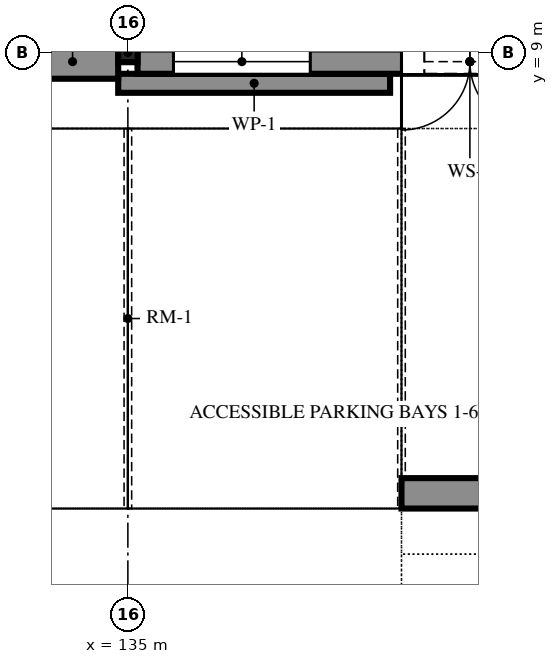
"""IFC4 building model, lengths in metres.
Left out: names, types, materials, properties, quantities, classifications, styles, units other than length and angle.
Written with IfcOpenShell. Run it as: python <this file> out.ifc"""

import sys

from ifc_helpers import new_model, si_unit, direction, frame, frame_2d, origin, origin_2d, place, context, subcontext, project, spatial, polyline, rectangle, i_section, outline, extrude, element, fill, save


model = new_model("IFC4")
c1 = context("Model", 3, precision=1e-05, world=origin(), true_north=direction((0.0, 1.0)))
c2 = subcontext(c1, "Body", "Model", "MODEL_VIEW")
j1 = project(units=[si_unit("LENGTHUNIT", "METRE"), si_unit("PLANEANGLEUNIT", "RADIAN")], contexts=[c1])
p1 = place(None, origin())
s1 = spatial("IfcSite", under=j1, at=p1, CompositionType="ELEMENT")
p2 = place(p1, origin())
s2 = spatial("IfcBuilding", under=s1, at=p2, CompositionType="ELEMENT")
p3 = place(p2, origin())
s3 = spatial("IfcBuildingStorey", under=s2, at=p3, CompositionType="ELEMENT", Elevation=0.0)
p4 = place(p3, frame((135.0, 9.0, -2.1), z_axis=(0.0, 0.0, 1.0), x_axis=(1.0, 0.0, 0.0)))
e1 = element("IfcColumn", 1, at=p4, inside=s3, PredefinedType="COLUMN", context=c2, shape_type="SweptSolid", body=[
    extrude(i_section(OverallWidth=0.255, OverallDepth=0.254, WebThickness=0.009, FlangeThickness=0.014, FilletRadius=0.013, at=origin_2d()), origin(), (0.0, 0.0, 1.0), 9.6),
])
p5 = place(p3, frame((133.673, 8.88, 0.0), z_axis=(0.0, 0.0, 1.0), x_axis=(1.0, 0.0, 0.0)))
e2 = element("IfcWall", 2, at=p5, inside=s3, PredefinedType="SOLIDWALL", context=c2, shape_type="SweptSolid", body=[
    extrude(rectangle(XDim=1.2, YDim=0.45, at=frame_2d((0.6, 0.0))), origin(), (0.0, 0.0, 1.0), 6.767),
])
p6 = place(p3, frame((135.127, 8.88, 0.0), z_axis=(0.0, 0.0, 1.0), x_axis=(1.0, 0.0, 0.0)))
e3 = element("IfcWall", 3, at=p6, inside=s3, PredefinedType="SOLIDWALL", context=c2, shape_type="SweptSolid", body=[
    extrude(rectangle(XDim=8.746, YDim=0.32, at=frame_2d((4.373, 0.0))), origin(), (0.0, 0.0, 1.0), 6.767),
])
p7 = place(p6, frame((3.473, 0.0, 0.0)))
e4 = element("IfcOpeningElement", 4, at=p7, cuts=e3, PredefinedType="OPENING", context=c2, shape_type="SweptSolid", body=[
    extrude(rectangle(XDim=1.8, YDim=2.1, at=frame_2d((0.9, 1.05))), frame((0.0, 0.17, 0.0), z_axis=(0.0, -1.0, 0.0), x_axis=(1.0, 0.0, 0.0)), (0.0, 0.0, 1.0), 0.34),
])
p8 = place(p6, frame((3.773, 0.0, 2.55)))
e5 = element("IfcOpeningElement", 5, at=p8, cuts=e3, PredefinedType="OPENING", context=c2, shape_type="SweptSolid", body=[
    extrude(rectangle(XDim=1.2, YDim=0.6, at=frame_2d((0.6, 0.3))), frame((0.0, 0.17, 0.0), z_axis=(0.0, -1.0, 0.0), x_axis=(1.0, 0.0, 0.0)), (0.0, 0.0, 1.0), 0.34),
])
p9 = place(p6, frame((0.473, 0.0, 0.9)))
e6 = element("IfcOpeningElement", 6, at=p9, cuts=e3, PredefinedType="OPENING", context=c2, shape_type="SweptSolid", body=[
    extrude(rectangle(XDim=1.8, YDim=3.6, at=frame_2d((0.9, 1.8))), frame((0.0, 0.17, 0.0), z_axis=(0.0, -1.0, 0.0), x_axis=(1.0, 0.0, 0.0)), (0.0, 0.0, 1.0), 0.34),
])
p10 = place(p6, frame((6.473, 0.0, 0.9)))
e7 = element("IfcOpeningElement", 7, at=p10, cuts=e3, PredefinedType="OPENING", context=c2, shape_type="SweptSolid", body=[
    extrude(rectangle(XDim=1.8, YDim=3.6, at=frame_2d((0.9, 1.8))), frame((0.0, 0.17, 0.0), z_axis=(0.0, -1.0, 0.0), x_axis=(1.0, 0.0, 0.0)), (0.0, 0.0, 1.0), 0.34),
])
p11 = place(p3, frame((134.873, 8.595, 0.0), z_axis=(0.0, 0.0, 1.0), x_axis=(1.0, 0.0, 0.0)))
e8 = element("IfcWall", 8, at=p11, inside=s3, PredefinedType="SOLIDWALL", context=c2, shape_type="SweptSolid", body=[
    extrude(outline(polyline([(0.0, 0.0), (3.577, 0.0), (3.577, 6.767), (0.0, 6.767), (0.0, 0.0)]), holes=[polyline([(0.577, 0.75), (0.577, 4.5), (0.619, 4.752), (0.787, 4.968), (0.934, 5.022), (1.06, 5.166), (1.333, 5.31), (1.627, 5.4), (1.921, 5.31), (2.194, 5.166), (2.32, 5.022), (2.467, 4.968), (2.635, 4.752), (2.677, 4.5), (2.677, 0.75), (0.577, 0.75)])]), frame((0.0, 0.125, 0.0), z_axis=(0.0, -1.0, 0.0), x_axis=(1.0, 0.0, 0.0)), (0.0, 0.0, 1.0), 0.25),
])
p12 = place(p3, frame((138.6, 3.2, -0.8), z_axis=(0.0, 0.0, 1.0), x_axis=(1.0, 0.0, 0.0)))
e9 = element("IfcWall", 9, at=p12, inside=s3, PredefinedType="SOLIDWALL", context=c2, shape_type="SweptSolid", body=[
    extrude(rectangle(XDim=27.4, YDim=0.4, at=frame_2d((13.7, 0.0))), origin(), (0.0, 0.0, 1.0), 0.8),
])
p13 = place(p7, frame((1.8, 0.0, 0.0), z_axis=(0.0, 0.0, 1.0), x_axis=(-1.0, 0.0, 0.0)))
e10 = element("IfcDoor", 10, at=p13, inside=s3, OperationType="DOUBLE_DOOR_SINGLE_SWING", PredefinedType="DOOR", context=c2, shape_type="SweptSolid", body=[
    extrude(outline(polyline([(0.0, 0.0), (0.07, 0.0), (0.07, 2.03), (1.73, 2.03), (1.73, 0.0), (1.8, 0.0), (1.8, 2.1), (0.0, 2.1), (0.0, 0.0)])), frame((0.0, 0.025, 0.0), z_axis=(0.0, -1.0, 0.0), x_axis=(1.0, 0.0, 0.0)), (0.0, 0.0, 1.0), 0.05),
    extrude(outline(polyline([(0.074, 0.01), (0.897, 0.01), (0.897, 2.026), (0.074, 2.026), (0.074, 0.01)]), holes=[polyline([(0.194, 0.16), (0.777, 0.16), (0.777, 1.01), (0.194, 1.01), (0.194, 0.16)]), polyline([(0.335, 1.16), (0.635, 1.16), (0.635, 1.76), (0.335, 1.76), (0.335, 1.16)])]), frame((0.0, 0.017, 0.0), z_axis=(0.0, -1.0, 0.0), x_axis=(1.0, 0.0, 0.0)), (0.0, 0.0, 1.0), 0.035),
    extrude(rectangle(XDim=0.583, YDim=0.85, at=frame_2d((0.485, 0.585))), frame((0.0, 0.009, 0.0), z_axis=(0.0, -1.0, 0.0), x_axis=(1.0, 0.0, 0.0)), (0.0, 0.0, 1.0), 0.017),
    extrude(rectangle(XDim=0.3, YDim=0.6, at=frame_2d((0.485, 1.46))), frame((0.0, 0.006, 0.0), z_axis=(0.0, -1.0, 0.0), x_axis=(1.0, 0.0, 0.0)), (0.0, 0.0, 1.0), 0.012),
    extrude(outline(polyline([(0.903, 0.01), (1.726, 0.01), (1.726, 2.026), (0.903, 2.026), (0.903, 0.01)]), holes=[polyline([(1.023, 0.16), (1.606, 0.16), (1.606, 1.01), (1.023, 1.01), (1.023, 0.16)]), polyline([(1.165, 1.16), (1.465, 1.16), (1.465, 1.76), (1.165, 1.76), (1.165, 1.16)])]), frame((0.0, 0.017, 0.0), z_axis=(0.0, -1.0, 0.0), x_axis=(1.0, 0.0, 0.0)), (0.0, 0.0, 1.0), 0.035),
    extrude(rectangle(XDim=0.583, YDim=0.85, at=frame_2d((1.314, 0.585))), frame((0.0, 0.009, 0.0), z_axis=(0.0, -1.0, 0.0), x_axis=(1.0, 0.0, 0.0)), (0.0, 0.0, 1.0), 0.017),
    extrude(rectangle(XDim=0.3, YDim=0.6, at=frame_2d((1.314, 1.46))), frame((0.0, 0.006, 0.0), z_axis=(0.0, -1.0, 0.0), x_axis=(1.0, 0.0, 0.0)), (0.0, 0.0, 1.0), 0.012),
])
fill(e4, e10)
p14 = place(p8, origin())
e11 = element("IfcWindow", 11, at=p14, inside=s3, PartitioningType="SINGLE_PANEL", PredefinedType="WINDOW", context=c2, shape_type="SweptSolid", body=[
    extrude(outline(polyline([(0.0, 0.0), (1.2, 0.0), (1.2, 0.6), (0.0, 0.6), (0.0, 0.0)]), holes=[polyline([(0.07, 0.07), (1.13, 0.07), (1.13, 0.53), (0.07, 0.53), (0.07, 0.07)])]), frame((0.0, 0.03, 0.0), z_axis=(0.0, -1.0, 0.0), x_axis=(1.0, 0.0, 0.0)), (0.0, 0.0, 1.0), 0.06),
    extrude(outline(polyline([(0.07, 0.07), (1.13, 0.07), (1.13, 0.53), (0.07, 0.53), (0.07, 0.07)]), holes=[polyline([(0.1, 0.1), (1.1, 0.1), (1.1, 0.5), (0.1, 0.5), (0.1, 0.1)])]), frame((0.0, 0.022, 0.0), z_axis=(0.0, -1.0, 0.0), x_axis=(1.0, 0.0, 0.0)), (0.0, 0.0, 1.0), 0.045),
    extrude(rectangle(XDim=1.0, YDim=0.4, at=frame_2d((0.6, 0.3))), frame((0.0, 0.006, 0.0), z_axis=(0.0, -1.0, 0.0), x_axis=(1.0, 0.0, 0.0)), (0.0, 0.0, 1.0), 0.012),
])
fill(e5, e11)
p15 = place(p9, origin())
e12 = element("IfcWindow", 12, at=p15, inside=s3, PartitioningType="TRIPLE_PANEL_HORIZONTAL", PredefinedType="WINDOW", context=c2, shape_type="SweptSolid", body=[
    extrude(outline(polyline([(0.0, 0.0), (1.8, 0.0), (1.8, 2.54), (1.793, 2.666), (1.771, 2.79), (1.734, 2.91), (1.684, 3.026), (1.62, 3.135), (1.545, 3.235), (1.458, 3.326), (1.361, 3.407), (1.255, 3.475), (1.142, 3.531), (1.023, 3.573), (0.9, 3.6), (0.777, 3.573), (0.658, 3.531), (0.545, 3.475), (0.439, 3.407), (0.342, 3.326), (0.255, 3.235), (0.18, 3.135), (0.116, 3.026), (0.066, 2.91), (0.03, 2.79), (0.007, 2.666), (0.0, 2.54), (0.0, 0.0)]), holes=[polyline([(0.07, 0.07), (1.73, 0.07), (1.73, 2.54), (1.723, 2.657), (1.703, 2.772), (1.669, 2.884), (1.623, 2.991), (1.565, 3.092), (1.495, 3.186), (1.415, 3.271), (1.325, 3.346), (1.228, 3.41), (1.124, 3.463), (1.014, 3.503), (0.9, 3.53), (0.786, 3.503), (0.677, 3.463), (0.572, 3.41), (0.475, 3.346), (0.385, 3.271), (0.305, 3.186), (0.235, 3.092), (0.177, 2.991), (0.131, 2.884), (0.097, 2.772), (0.077, 2.657), (0.07, 2.54), (0.07, 0.07)])]), frame((0.0, 0.03, 0.0), z_axis=(0.0, -1.0, 0.0), x_axis=(1.0, 0.0, 0.0)), (0.0, 0.0, 1.0), 0.06),
    extrude(outline(polyline([(0.0, 2.54), (0.007, 2.666), (0.03, 2.79), (0.066, 2.91), (0.116, 3.026), (0.18, 3.135), (0.255, 3.235), (0.342, 3.326), (0.439, 3.407), (0.545, 3.475), (0.658, 3.531), (0.777, 3.573), (0.9, 3.6), (0.0, 3.6), (0.0, 2.54)])), frame((0.0, 0.028, 0.0), z_axis=(0.0, -1.0, 0.0), x_axis=(1.0, 0.0, 0.0)), (0.0, 0.0, 1.0), 0.056),
    extrude(outline(polyline([(0.9, 3.6), (1.023, 3.573), (1.142, 3.531), (1.255, 3.475), (1.361, 3.407), (1.458, 3.326), (1.545, 3.235), (1.62, 3.135), (1.684, 3.026), (1.734, 2.91), (1.771, 2.79), (1.793, 2.666), (1.8, 2.54), (1.8, 3.6), (0.9, 3.6)])), frame((0.0, 0.027, 0.0), z_axis=(0.0, -1.0, 0.0), x_axis=(1.0, 0.0, 0.0)), (0.0, 0.0, 1.0), 0.054),
    extrude(outline(polyline([(1.728, 2.58), (0.073, 2.58), (0.07, 2.54), (0.07, 2.5), (1.73, 2.5), (1.73, 2.54), (1.728, 2.58)])), frame((0.0, 0.021, 0.0), z_axis=(0.0, -1.0, 0.0), x_axis=(1.0, 0.0, 0.0)), (0.0, 0.0, 1.0), 0.042),
    extrude(rectangle(XDim=1.66, YDim=0.04, at=frame_2d((0.9, 0.873))), frame((0.0, 0.021, 0.0), z_axis=(0.0, -1.0, 0.0), x_axis=(1.0, 0.0, 0.0)), (0.0, 0.0, 1.0), 0.043),
    extrude(rectangle(XDim=1.66, YDim=0.04, at=frame_2d((0.9, 1.697))), frame((0.0, 0.021, 0.0), z_axis=(0.0, -1.0, 0.0), x_axis=(1.0, 0.0, 0.0)), (0.0, 0.0, 1.0), 0.043),
    extrude(outline(polyline([(0.07, 0.07), (1.73, 0.07), (1.73, 0.853), (0.07, 0.853), (0.07, 0.07)]), holes=[polyline([(0.1, 0.1), (1.7, 0.1), (1.7, 0.823), (0.1, 0.823), (0.1, 0.1)])]), frame((0.0, 0.022, 0.0), z_axis=(0.0, -1.0, 0.0), x_axis=(1.0, 0.0, 0.0)), (0.0, 0.0, 1.0), 0.045),
    extrude(rectangle(XDim=1.6, YDim=0.723, at=frame_2d((0.9, 0.462))), frame((0.0, 0.006, 0.0), z_axis=(0.0, -1.0, 0.0), x_axis=(1.0, 0.0, 0.0)), (0.0, 0.0, 1.0), 0.012),
    extrude(outline(polyline([(0.07, 0.893), (1.73, 0.893), (1.73, 1.677), (0.07, 1.677), (0.07, 0.893)]), holes=[polyline([(0.1, 0.923), (1.7, 0.923), (1.7, 1.647), (0.1, 1.647), (0.1, 0.923)])]), frame((0.0, 0.022, 0.0), z_axis=(0.0, -1.0, 0.0), x_axis=(1.0, 0.0, 0.0)), (0.0, 0.0, 1.0), 0.045),
    extrude(rectangle(XDim=1.6, YDim=0.723, at=frame_2d((0.9, 1.285))), frame((0.0, 0.006, 0.0), z_axis=(0.0, -1.0, 0.0), x_axis=(1.0, 0.0, 0.0)), (0.0, 0.0, 1.0), 0.012),
    extrude(outline(polyline([(0.07, 1.717), (1.73, 1.717), (1.73, 2.5), (0.07, 2.5), (0.07, 1.717)]), holes=[polyline([(0.1, 1.747), (1.7, 1.747), (1.7, 2.47), (0.1, 2.47), (0.1, 1.747)])]), frame((0.0, 0.022, 0.0), z_axis=(0.0, -1.0, 0.0), x_axis=(1.0, 0.0, 0.0)), (0.0, 0.0, 1.0), 0.045),
    extrude(rectangle(XDim=1.6, YDim=0.723, at=frame_2d((0.9, 2.108))), frame((0.0, 0.006, 0.0), z_axis=(0.0, -1.0, 0.0), x_axis=(1.0, 0.0, 0.0)), (0.0, 0.0, 1.0), 0.012),
    extrude(outline(polyline([(0.073, 2.58), (1.728, 2.58), (1.723, 2.657), (1.703, 2.772), (1.669, 2.884), (1.623, 2.991), (1.565, 3.092), (1.495, 3.186), (1.415, 3.271), (1.325, 3.346), (1.228, 3.41), (1.124, 3.463), (1.014, 3.503), (0.9, 3.53), (0.786, 3.503), (0.677, 3.463), (0.572, 3.41), (0.475, 3.346), (0.385, 3.271), (0.305, 3.186), (0.235, 3.092), (0.177, 2.991), (0.131, 2.884), (0.097, 2.772), (0.077, 2.657), (0.073, 2.58)]), holes=[polyline([(0.112, 2.653), (0.131, 2.764), (0.164, 2.872), (0.208, 2.975), (0.265, 3.073), (0.332, 3.164), (0.409, 3.246), (0.496, 3.318), (0.59, 3.38), (0.69, 3.431), (0.796, 3.469), (0.9, 3.494), (1.004, 3.469), (1.11, 3.431), (1.21, 3.38), (1.304, 3.318), (1.391, 3.246), (1.468, 3.164), (1.535, 3.073), (1.592, 2.975), (1.636, 2.872), (1.669, 2.764), (1.688, 2.653), (1.69, 2.615), (0.11, 2.615), (0.112, 2.653)])]), frame((0.0, 0.022, 0.0), z_axis=(0.0, -1.0, 0.0), x_axis=(1.0, 0.0, 0.0)), (0.0, 0.0, 1.0), 0.045),
    extrude(outline(polyline([(0.11, 2.615), (1.69, 2.615), (1.688, 2.653), (1.669, 2.764), (1.636, 2.872), (1.592, 2.975), (1.535, 3.073), (1.468, 3.164), (1.391, 3.246), (1.304, 3.318), (1.21, 3.38), (1.11, 3.431), (1.004, 3.469), (0.9, 3.494), (0.796, 3.469), (0.69, 3.431), (0.59, 3.38), (0.496, 3.318), (0.409, 3.246), (0.332, 3.164), (0.265, 3.073), (0.208, 2.975), (0.164, 2.872), (0.131, 2.764), (0.112, 2.653), (0.11, 2.615)])), frame((0.0, 0.006, 0.0), z_axis=(0.0, -1.0, 0.0), x_axis=(1.0, 0.0, 0.0)), (0.0, 0.0, 1.0), 0.012),
])
fill(e6, e12)
save(model, sys.argv[1])
